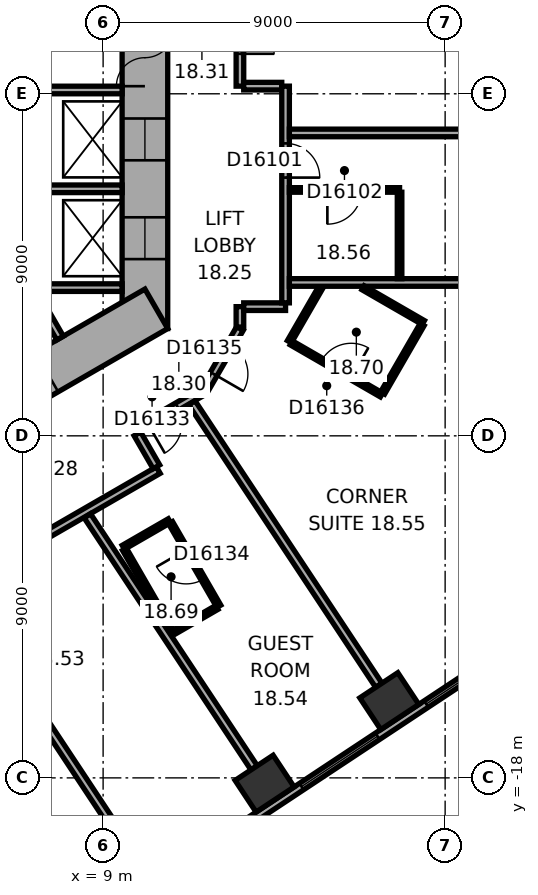
"""IFC4 building model, lengths in metres.
Left out: names, types, materials, properties, quantities, classifications, styles, units other than length and angle.
Written with IfcOpenShell. Run it as: python <this file> out.ifc"""

import sys

from ifc_helpers import new_model, si_unit, direction, frame, frame_2d, origin, origin_2d, place, context, subcontext, project, spatial, rectangle, extrude, element, fill, save


model = new_model("IFC4")
c1 = context("Model", 3, precision=1e-05, world=origin(), true_north=direction((0.0, 1.0)))
c2 = subcontext(c1, "Body", "Model", "MODEL_VIEW")
j1 = project(units=[si_unit("LENGTHUNIT", "METRE"), si_unit("PLANEANGLEUNIT", "RADIAN")], contexts=[c1])
p1 = place(None, origin())
s1 = spatial("IfcSite", under=j1, at=p1, CompositionType="ELEMENT")
p2 = place(p1, origin())
s2 = spatial("IfcBuilding", under=s1, at=p2, CompositionType="ELEMENT")
p3 = place(p2, frame((0.0, 0.0, 83.6)))
s3 = spatial("IfcBuildingStorey", under=s2, at=p3, CompositionType="ELEMENT", Elevation=83.6)
for number, where, z_axis, x_axis in (
    (1, (13.25, -18.152, 0.0), (0.0, 0.0, 1.0), (0.834, 0.552, 0.0)),
    (2, (16.531, -15.981, 0.0), (0.0, 0.0, 1.0), (0.834, 0.552, 0.0)),
):
    element("IfcColumn", number, at=place(p3, frame(where, z_axis=z_axis, x_axis=x_axis)), inside=s3, PredefinedType="COLUMN", context=c2, shape_type="SweptSolid", body=[
        extrude(rectangle(XDim=1.2, YDim=1.0, at=origin_2d()), origin(), (0.0, 0.0, 1.0), 3.3),
    ])
p4 = place(p3, frame((10.1, -6.177, 0.0), z_axis=(0.0, 0.0, 1.0), x_axis=(0.0, 1.0, 0.0)))
e3 = element("IfcWall", 3, at=p4, inside=s3, PredefinedType="SHEAR", context=c2, shape_type="SweptSolid", body=[
    extrude(rectangle(XDim=12.355, YDim=1.2, at=frame_2d((6.177, 0.0))), origin(), (0.0, 0.0, 1.0), 3.3),
])
p5 = place(p4, frame((6.378, 0.0, 0.0)))
e4 = element("IfcOpeningElement", 4, at=p5, cuts=e3, PredefinedType="OPENING", context=c2, shape_type="SweptSolid", body=[
    extrude(rectangle(XDim=1.5, YDim=2.1, at=frame_2d((0.75, 1.05))), frame((0.0, 0.61, 0.0), z_axis=(0.0, -1.0, 0.0), x_axis=(1.0, 0.0, 0.0)), (0.0, 0.0, 1.0), 1.22),
])
p6 = place(p4, frame((1.828, 0.0, 0.0)))
e5 = element("IfcOpeningElement", 5, at=p6, cuts=e3, PredefinedType="OPENING", context=c2, shape_type="SweptSolid", body=[
    extrude(rectangle(XDim=1.1, YDim=2.1, at=frame_2d((0.55, 1.05))), frame((0.0, 0.61, 0.0), z_axis=(0.0, -1.0, 0.0), x_axis=(1.0, 0.0, 0.0)), (0.0, 0.0, 1.0), 1.22),
])
p7 = place(p4, frame((4.427, 0.0, 0.0)))
e6 = element("IfcOpeningElement", 6, at=p7, cuts=e3, PredefinedType="OPENING", context=c2, shape_type="SweptSolid", body=[
    extrude(rectangle(XDim=1.1, YDim=2.1, at=frame_2d((0.55, 1.05))), frame((0.0, 0.61, 0.0), z_axis=(0.0, -1.0, 0.0), x_axis=(1.0, 0.0, 0.0)), (0.0, 0.0, 1.0), 1.22),
])
p8 = place(p3, frame((-0.3, -11.836, 0.0), z_axis=(0.0, 0.0, 1.0), x_axis=(0.866021384402, 0.500006961711, 0.0)))
e7 = element("IfcWall", 7, at=p8, inside=s3, PredefinedType="SHEAR", context=c2, shape_type="SweptSolid", body=[
    extrude(rectangle(XDim=12.355, YDim=1.2, at=frame_2d((6.178, 0.0))), origin(), (0.0, 0.0, 1.0), 3.3),
])
p9 = place(p8, frame((4.128, 0.0, 0.0)))
e8 = element("IfcOpeningElement", 8, at=p9, cuts=e7, PredefinedType="OPENING", context=c2, shape_type="SweptSolid", body=[
    extrude(rectangle(XDim=0.9, YDim=2.1, at=frame_2d((0.45, 1.05))), frame((0.0, 0.61, 0.0), z_axis=(0.0, -1.0, 0.0), x_axis=(1.0, 0.0, 0.0)), (0.0, 0.0, 1.0), 1.22),
])
p10 = place(p8, frame((7.928, 0.0, 0.0)))
e9 = element("IfcOpeningElement", 9, at=p10, cuts=e7, PredefinedType="OPENING", context=c2, shape_type="SweptSolid", body=[
    extrude(rectangle(XDim=1.1, YDim=2.1, at=frame_2d((0.55, 1.05))), frame((0.0, 0.61, 0.0), z_axis=(0.0, -1.0, 0.0), x_axis=(1.0, 0.0, 0.0)), (0.0, 0.0, 1.0), 1.22),
])
p11 = place(p3, frame((3.083, -25.601, 0.0), z_axis=(0.0, 0.0, 1.0), x_axis=(0.833884295743, 0.551939291329, 0.0)))
e10 = element("IfcWall", 10, at=p11, inside=s3, PredefinedType="STANDARD", context=c2, shape_type="SweptSolid", body=[
    extrude(rectangle(XDim=21.246, YDim=0.2, at=frame_2d((10.623, 0.0))), origin(), (0.0, 0.0, 1.0), 3.3),
])
p12 = place(p11, frame((1.553, 0.0, 0.8)))
e11 = element("IfcOpeningElement", 11, at=p12, cuts=e10, PredefinedType="OPENING", context=c2, shape_type="SweptSolid", body=[
    extrude(rectangle(XDim=2.4, YDim=1.7, at=frame_2d((1.2, 0.85))), frame((0.0, 0.11, 0.0), z_axis=(0.0, -1.0, 0.0), x_axis=(1.0, 0.0, 0.0)), (0.0, 0.0, 1.0), 0.22),
])
p13 = place(p11, frame((5.488, 0.0, 0.8)))
e12 = element("IfcOpeningElement", 12, at=p13, cuts=e10, PredefinedType="OPENING", context=c2, shape_type="SweptSolid", body=[
    extrude(rectangle(XDim=2.4, YDim=1.7, at=frame_2d((1.2, 0.85))), frame((0.0, 0.11, 0.0), z_axis=(0.0, -1.0, 0.0), x_axis=(1.0, 0.0, 0.0)), (0.0, 0.0, 1.0), 0.22),
])
p14 = place(p11, frame((9.422, 0.0, 0.8)))
e13 = element("IfcOpeningElement", 13, at=p14, cuts=e10, PredefinedType="OPENING", context=c2, shape_type="SweptSolid", body=[
    extrude(rectangle(XDim=2.4, YDim=1.7, at=frame_2d((1.2, 0.85))), frame((0.0, 0.11, 0.0), z_axis=(0.0, -1.0, 0.0), x_axis=(1.0, 0.0, 0.0)), (0.0, 0.0, 1.0), 0.22),
])
p15 = place(p11, frame((13.357, 0.0, 0.8)))
e14 = element("IfcOpeningElement", 14, at=p15, cuts=e10, PredefinedType="OPENING", context=c2, shape_type="SweptSolid", body=[
    extrude(rectangle(XDim=2.4, YDim=1.7, at=frame_2d((1.2, 0.85))), frame((0.0, 0.11, 0.0), z_axis=(0.0, -1.0, 0.0), x_axis=(1.0, 0.0, 0.0)), (0.0, 0.0, 1.0), 0.22),
])
p16 = place(p11, frame((17.291, 0.0, 0.8)))
e15 = element("IfcOpeningElement", 15, at=p16, cuts=e10, PredefinedType="OPENING", context=c2, shape_type="SweptSolid", body=[
    extrude(rectangle(XDim=2.4, YDim=1.7, at=frame_2d((1.2, 0.85))), frame((0.0, 0.11, 0.0), z_axis=(0.0, -1.0, 0.0), x_axis=(1.0, 0.0, 0.0)), (0.0, 0.0, 1.0), 0.22),
])
for number, where, z_axis, x_axis in (
    (16, (7.3, -5.1, 0.0), (0.0, 0.0, 1.0), (1.0, 0.0, 0.0)),
    (17, (7.3, -2.5, 0.0), (0.0, 0.0, 1.0), (1.0, 0.0, 0.0)),
    (18, (7.3, 0.1, 0.0), (0.0, 0.0, 1.0), (1.0, 0.0, 0.0)),
    (19, (6.768, -4.522, 0.0), (0.0, 0.0, 1.0), (0.5, -0.866, 0.0)),
):
    element("IfcWall", number, at=place(p3, frame(where, z_axis=z_axis, x_axis=x_axis)), inside=s3, PredefinedType="PARTITIONING", context=c2, shape_type="SweptSolid", body=[
        extrude(rectangle(XDim=2.2, YDim=0.2, at=frame_2d((1.1, 0.0))), origin(), (0.0, 0.0, 1.0), 3.05),
    ])
p17 = place(p3, frame((7.419, -11.653, 0.0), z_axis=(0.0, 0.0, 1.0), x_axis=(0.866038154057, 0.49997791523, 0.0)))
e20 = element("IfcWall", 20, at=p17, inside=s3, PredefinedType="PARTITIONING", context=c2, shape_type="SweptSolid", body=[
    extrude(rectangle(XDim=3.502, YDim=0.2, at=frame_2d((1.751, 0.0))), origin(), (0.0, 0.0, 1.0), 3.05),
])
p18 = place(p3, frame((9.532, -11.934, 0.0), z_axis=(0.0, 0.0, 1.0), x_axis=(0.866034573852, 0.49998411664, 0.0)))
e21 = element("IfcWall", 21, at=p18, inside=s3, PredefinedType="PARTITIONING", context=c2, shape_type="SweptSolid", body=[
    extrude(rectangle(XDim=1.4, YDim=0.12, at=frame_2d((0.7, 0.0))), origin(), (0.0, 0.0, 1.0), 3.05),
])
p19 = place(p3, frame((9.693, -19.907, 0.0), z_axis=(0.0, 0.0, 1.0), x_axis=(-0.551938394837, 0.833884889121, 0.0)))
e22 = element("IfcWall", 22, at=p19, inside=s3, PredefinedType="PARTITIONING", context=c2, shape_type="SweptSolid", body=[
    extrude(rectangle(XDim=9.394, YDim=0.2, at=frame_2d((4.697, 0.0))), origin(), (0.0, 0.0, 1.0), 2.6),
])
p20 = place(p3, frame((9.852, -8.861, 0.0), z_axis=(0.0, 0.0, 1.0), x_axis=(0.866013291437, 0.500020978615, 0.0)))
e23 = element("IfcWall", 23, at=p20, inside=s3, PredefinedType="PARTITIONING", context=c2, shape_type="SweptSolid", body=[
    extrude(rectangle(XDim=2.077, YDim=0.2, at=frame_2d((1.038, 0.0))), origin(), (0.0, 0.0, 1.0), 3.05),
])
p21 = place(p20, frame((0.372, 0.0, 0.0)))
e24 = element("IfcOpeningElement", 24, at=p21, cuts=e23, PredefinedType="OPENING", context=c2, shape_type="SweptSolid", body=[
    extrude(rectangle(XDim=0.9, YDim=2.1, at=frame_2d((0.45, 1.05))), frame((0.0, 0.11, 0.0), z_axis=(0.0, -1.0, 0.0), x_axis=(1.0, 0.0, 0.0)), (0.0, 0.0, 1.0), 0.22),
])
p22 = place(p3, frame((10.402, -9.815, 0.0), z_axis=(0.0, 0.0, 1.0), x_axis=(-0.499968756647, 0.866043441391, 0.0)))
e25 = element("IfcWall", 25, at=p22, inside=s3, PredefinedType="PARTITIONING", context=c2, shape_type="SweptSolid", body=[
    extrude(rectangle(XDim=1.001, YDim=0.2, at=frame_2d((0.5, 0.0))), origin(), (0.0, 0.0, 1.0), 3.05),
])
p23 = place(p3, frame((10.775, -11.286, 0.0), z_axis=(0.0, 0.0, 1.0), x_axis=(0.500046963369, -0.865998287773, 0.0)))
e26 = element("IfcWall", 26, at=p23, inside=s3, PredefinedType="PARTITIONING", context=c2, shape_type="SweptSolid", body=[
    extrude(rectangle(XDim=2.54, YDim=0.12, at=frame_2d((1.27, 0.0))), origin(), (0.0, 0.0, 1.0), 3.05),
])
p24 = place(p23, frame((0.82, 0.0, 0.0)))
e27 = element("IfcOpeningElement", 27, at=p24, cuts=e26, PredefinedType="OPENING", context=c2, shape_type="SweptSolid", body=[
    extrude(rectangle(XDim=0.9, YDim=2.1, at=frame_2d((0.45, 1.05))), frame((0.0, 0.07, 0.0), z_axis=(0.0, -1.0, 0.0), x_axis=(1.0, 0.0, 0.0)), (0.0, 0.0, 1.0), 0.14),
])
p25 = place(p3, frame((10.833, -14.185, 0.0), z_axis=(0.0, 0.0, 1.0), x_axis=(-0.500005339912, 0.866022320763, 0.0)))
e28 = element("IfcWall", 28, at=p25, inside=s3, PredefinedType="PARTITIONING", context=c2, shape_type="SweptSolid", body=[
    extrude(rectangle(XDim=2.54, YDim=0.12, at=frame_2d((1.27, 0.0))), origin(), (0.0, 0.0, 1.0), 3.05),
])
p26 = place(p3, frame((11.67, -7.788, 0.0), z_axis=(0.0, 0.0, 1.0), x_axis=(0.500063286585, 0.865988862174, 0.0)))
e29 = element("IfcWall", 29, at=p26, inside=s3, PredefinedType="PARTITIONING", context=c2, shape_type="SweptSolid", body=[
    extrude(rectangle(XDim=1.86, YDim=0.2, at=frame_2d((0.93, 0.0))), origin(), (0.0, 0.0, 1.0), 3.05),
])
p27 = place(p26, frame((0.48, 0.0, 0.0)))
e30 = element("IfcOpeningElement", 30, at=p27, cuts=e29, PredefinedType="OPENING", context=c2, shape_type="SweptSolid", body=[
    extrude(rectangle(XDim=0.9, YDim=2.1, at=frame_2d((0.45, 1.05))), frame((0.0, 0.11, 0.0), z_axis=(0.0, -1.0, 0.0), x_axis=(1.0, 0.0, 0.0)), (0.0, 0.0, 1.0), 0.22),
])
p28 = place(p3, frame((11.993, -13.515, 0.0), z_axis=(0.0, 0.0, 1.0), x_axis=(-0.865956862152, -0.500118698802, 0.0)))
e31 = element("IfcWall", 31, at=p28, inside=s3, PredefinedType="PARTITIONING", context=c2, shape_type="SweptSolid", body=[
    extrude(rectangle(XDim=1.28, YDim=0.12, at=frame_2d((0.64, 0.0))), origin(), (0.0, 0.0, 1.0), 3.05),
])
p29 = place(p3, frame((12.6, -6.138, 0.0), z_axis=(0.0, 0.0, 1.0), x_axis=(0.0, 1.0, 0.0)))
e32 = element("IfcWall", 32, at=p29, inside=s3, PredefinedType="PARTITIONING", context=c2, shape_type="SweptSolid", body=[
    extrude(rectangle(XDim=0.537, YDim=0.2, at=frame_2d((0.268, 0.0))), origin(), (0.0, 0.0, 1.0), 3.05),
])
p30 = place(p3, frame((12.6, 0.201, 0.0), z_axis=(0.0, 0.0, 1.0), x_axis=(0.0, 1.0, 0.0)))
e33 = element("IfcWall", 33, at=p30, inside=s3, PredefinedType="PARTITIONING", context=c2, shape_type="SweptSolid", body=[
    extrude(rectangle(XDim=2.604, YDim=0.2, at=frame_2d((1.302, 0.0))), origin(), (0.0, 0.0, 1.0), 3.05),
])
p31 = place(p30, frame((0.852, 0.0, 0.0)))
e34 = element("IfcOpeningElement", 34, at=p31, cuts=e33, PredefinedType="OPENING", context=c2, shape_type="SweptSolid", body=[
    extrude(rectangle(XDim=0.9, YDim=2.1, at=frame_2d((0.45, 1.05))), frame((0.0, 0.11, 0.0), z_axis=(0.0, -1.0, 0.0), x_axis=(1.0, 0.0, 0.0)), (0.0, 0.0, 1.0), 0.22),
])
p32 = place(p3, frame((12.7, -5.601, 0.0), z_axis=(0.0, 0.0, 1.0), x_axis=(1.0, 0.0, 0.0)))
e35 = element("IfcWall", 35, at=p32, inside=s3, PredefinedType="PARTITIONING", context=c2, shape_type="SweptSolid", body=[
    extrude(rectangle(XDim=1.101, YDim=0.2, at=frame_2d((0.551, 0.0))), origin(), (0.0, 0.0, 1.0), 3.05),
])
p33 = place(p3, frame((12.974, -17.735, 0.0), z_axis=(0.0, 0.0, 1.0), x_axis=(-0.55192625685, 0.833892922982, 0.0)))
e36 = element("IfcWall", 36, at=p33, inside=s3, PredefinedType="PARTITIONING", context=c2, shape_type="SweptSolid", body=[
    extrude(rectangle(XDim=7.95, YDim=0.2, at=frame_2d((3.975, 0.0))), origin(), (0.0, 0.0, 1.0), 3.05),
])
p34 = place(p3, frame((13.701, 0.201, 0.0), z_axis=(0.0, 0.0, 1.0), x_axis=(-1.0, 0.0, 0.0)))
e37 = element("IfcWall", 37, at=p34, inside=s3, PredefinedType="PARTITIONING", context=c2, shape_type="SweptSolid", body=[
    extrude(rectangle(XDim=1.001, YDim=0.2, at=frame_2d((0.5, 0.0))), origin(), (0.0, 0.0, 1.0), 3.05),
])
p35 = place(p3, frame((13.801, -5.501, 0.0), z_axis=(0.0, 0.0, 1.0), x_axis=(0.0, 1.0, 0.0)))
e38 = element("IfcWall", 38, at=p35, inside=s3, PredefinedType="PARTITIONING", context=c2, shape_type="SweptSolid", body=[
    extrude(rectangle(XDim=5.702, YDim=0.2, at=frame_2d((2.851, 0.0))), origin(), (0.0, 0.0, 1.0), 3.05),
])
p36 = place(p35, frame((3.296, 0.0, 0.0)))
e39 = element("IfcOpeningElement", 39, at=p36, cuts=e38, PredefinedType="OPENING", context=c2, shape_type="SweptSolid", body=[
    extrude(rectangle(XDim=0.9, YDim=2.1, at=frame_2d((0.45, 1.05))), frame((0.0, 0.11, 0.0), z_axis=(0.0, -1.0, 0.0), x_axis=(1.0, 0.0, 0.0)), (0.0, 0.0, 1.0), 0.22),
])
p37 = place(p3, frame((13.901, -6.524, 0.0), z_axis=(0.0, 0.0, 1.0), x_axis=(0.499964162598, 0.86604609353, 0.0)))
e40 = element("IfcWall", 40, at=p37, inside=s3, PredefinedType="PARTITIONING", context=c2, shape_type="SweptSolid", body=[
    extrude(rectangle(XDim=1.661, YDim=0.12, at=frame_2d((0.831, 0.0))), origin(), (0.0, 0.0, 1.0), 3.05),
])
p38 = place(p3, frame((13.901, -4.965, 0.0), z_axis=(0.0, 0.0, 1.0), x_axis=(1.0, 0.0, 0.0)))
e41 = element("IfcWall", 41, at=p38, inside=s3, PredefinedType="PARTITIONING", context=c2, shape_type="SweptSolid", body=[
    extrude(rectangle(XDim=8.049, YDim=0.2, at=frame_2d((4.024, 0.0))), origin(), (0.0, 0.0, 1.0), 3.05),
])
p39 = place(p3, frame((13.901, -2.53, 0.0), z_axis=(0.0, 0.0, 1.0), x_axis=(1.0, 0.0, 0.0)))
e42 = element("IfcWall", 42, at=p39, inside=s3, PredefinedType="PARTITIONING", context=c2, shape_type="SweptSolid", body=[
    extrude(rectangle(XDim=2.9, YDim=0.12, at=frame_2d((1.45, 0.0))), origin(), (0.0, 0.0, 1.0), 3.05),
])
p40 = place(p39, frame((1.0, 0.0, 0.0)))
e43 = element("IfcOpeningElement", 43, at=p40, cuts=e42, PredefinedType="OPENING", context=c2, shape_type="SweptSolid", body=[
    extrude(rectangle(XDim=0.9, YDim=2.1, at=frame_2d((0.45, 1.05))), frame((0.0, 0.07, 0.0), z_axis=(0.0, -1.0, 0.0), x_axis=(1.0, 0.0, 0.0)), (0.0, 0.0, 1.0), 0.14),
])
p41 = place(p3, frame((15.841, -5.104, 0.0), z_axis=(0.0, 0.0, 1.0), x_axis=(0.866025591402, -0.499999675036, 0.0)))
e44 = element("IfcWall", 44, at=p41, inside=s3, PredefinedType="PARTITIONING", context=c2, shape_type="SweptSolid", body=[
    extrude(rectangle(XDim=1.83, YDim=0.12, at=frame_2d((0.915, 0.0))), origin(), (0.0, 0.0, 1.0), 3.05),
])
p42 = place(p3, frame((16.255, -15.564, 0.0), z_axis=(0.0, 0.0, 1.0), x_axis=(-0.55192208744, 0.833895682562, 0.0)))
e45 = element("IfcWall", 45, at=p42, inside=s3, PredefinedType="PARTITIONING", context=c2, shape_type="SweptSolid", body=[
    extrude(rectangle(XDim=8.913, YDim=0.2, at=frame_2d((4.457, 0.0))), origin(), (0.0, 0.0, 1.0), 2.6),
])
p43 = place(p3, frame((16.326, -7.925, 0.0), z_axis=(0.0, 0.0, 1.0), x_axis=(-0.865997131366, 0.500048966069, 0.0)))
e46 = element("IfcWall", 46, at=p43, inside=s3, PredefinedType="PARTITIONING", context=c2, shape_type="SweptSolid", body=[
    extrude(rectangle(XDim=2.74, YDim=0.12, at=frame_2d((1.37, 0.0))), origin(), (0.0, 0.0, 1.0), 3.05),
])
p44 = place(p43, frame((0.92, 0.0, 0.0)))
e47 = element("IfcOpeningElement", 47, at=p44, cuts=e46, PredefinedType="OPENING", context=c2, shape_type="SweptSolid", body=[
    extrude(rectangle(XDim=0.9, YDim=2.1, at=frame_2d((0.45, 1.05))), frame((0.0, 0.07, 0.0), z_axis=(0.0, -1.0, 0.0), x_axis=(1.0, 0.0, 0.0)), (0.0, 0.0, 1.0), 0.14),
])
p45 = place(p3, frame((16.801, -2.59, 0.0), z_axis=(0.0, 0.0, 1.0), x_axis=(0.0, -1.0, 0.0)))
e48 = element("IfcWall", 48, at=p45, inside=s3, PredefinedType="PARTITIONING", context=c2, shape_type="SweptSolid", body=[
    extrude(rectangle(XDim=2.274, YDim=0.12, at=frame_2d((1.137, 0.0))), origin(), (0.0, 0.0, 1.0), 3.05),
])
p46 = place(p3, frame((17.396, -6.071, 0.0), z_axis=(0.0, 0.0, 1.0), x_axis=(-0.500027264788, -0.866009661879, 0.0)))
e49 = element("IfcWall", 49, at=p46, inside=s3, PredefinedType="PARTITIONING", context=c2, shape_type="SweptSolid", body=[
    extrude(rectangle(XDim=2.08, YDim=0.12, at=frame_2d((1.04, 0.0))), origin(), (0.0, 0.0, 1.0), 3.05),
])
p47 = place(p3, frame((21.95, -1.03, 0.0), z_axis=(0.0, 0.0, 1.0), x_axis=(-1.0, 0.0, 0.0)))
e50 = element("IfcWall", 50, at=p47, inside=s3, PredefinedType="PARTITIONING", context=c2, shape_type="SweptSolid", body=[
    extrude(rectangle(XDim=8.049, YDim=0.2, at=frame_2d((4.024, 0.0))), origin(), (0.0, 0.0, 1.0), 2.6),
])
p48 = place(p15, origin())
e51 = element("IfcWindow", 51, at=p48, inside=s3, PartitioningType="SINGLE_PANEL", PredefinedType="WINDOW", context=c2, shape_type="SweptSolid", body=[
    extrude(rectangle(XDim=2.4, YDim=1.7, at=frame_2d((1.2, 0.85))), frame((0.0, 0.03, 0.0), z_axis=(0.0, -1.0, 0.0), x_axis=(1.0, 0.0, 0.0)), (0.0, 0.0, 1.0), 0.06),
])
fill(e14, e51)
p49 = place(p16, origin())
e52 = element("IfcWindow", 52, at=p49, inside=s3, PartitioningType="SINGLE_PANEL", PredefinedType="WINDOW", context=c2, shape_type="SweptSolid", body=[
    extrude(rectangle(XDim=2.4, YDim=1.7, at=frame_2d((1.2, 0.85))), frame((0.0, 0.03, 0.0), z_axis=(0.0, -1.0, 0.0), x_axis=(1.0, 0.0, 0.0)), (0.0, 0.0, 1.0), 0.06),
])
fill(e15, e52)
p50 = place(p5, origin())
e53 = element("IfcDoor", 53, at=p50, inside=s3, OperationType="DOUBLE_DOOR_SINGLE_SWING", PredefinedType="DOOR", context=c2, shape_type="SweptSolid", body=[
    extrude(rectangle(XDim=1.5, YDim=2.1, at=frame_2d((0.75, 1.05))), frame((0.0, 0.025, 0.0), z_axis=(0.0, -1.0, 0.0), x_axis=(1.0, 0.0, 0.0)), (0.0, 0.0, 1.0), 0.05),
])
fill(e4, e53)
p51 = place(p6, origin())
e54 = element("IfcDoor", 54, at=p51, inside=s3, OperationType="DOUBLE_DOOR_SLIDING", PredefinedType="DOOR", context=c2, shape_type="SweptSolid", body=[
    extrude(rectangle(XDim=1.1, YDim=2.1, at=frame_2d((0.55, 1.05))), frame((0.0, 0.025, 0.0), z_axis=(0.0, -1.0, 0.0), x_axis=(1.0, 0.0, 0.0)), (0.0, 0.0, 1.0), 0.05),
])
fill(e5, e54)
p52 = place(p7, origin())
e55 = element("IfcDoor", 55, at=p52, inside=s3, OperationType="DOUBLE_DOOR_SLIDING", PredefinedType="DOOR", context=c2, shape_type="SweptSolid", body=[
    extrude(rectangle(XDim=1.1, YDim=2.1, at=frame_2d((0.55, 1.05))), frame((0.0, 0.025, 0.0), z_axis=(0.0, -1.0, 0.0), x_axis=(1.0, 0.0, 0.0)), (0.0, 0.0, 1.0), 0.05),
])
fill(e6, e55)
p53 = place(p36, origin())
e56 = element("IfcDoor", 56, at=p53, inside=s3, OperationType="SINGLE_SWING_LEFT", PredefinedType="DOOR", context=c2, shape_type="SweptSolid", body=[
    extrude(rectangle(XDim=0.9, YDim=2.1, at=frame_2d((0.45, 1.05))), frame((0.0, 0.025, 0.0), z_axis=(0.0, -1.0, 0.0), x_axis=(1.0, 0.0, 0.0)), (0.0, 0.0, 1.0), 0.05),
])
fill(e39, e56)
p54 = place(p40, origin())
e57 = element("IfcDoor", 57, at=p54, inside=s3, OperationType="SINGLE_SWING_LEFT", PredefinedType="DOOR", context=c2, shape_type="SweptSolid", body=[
    extrude(rectangle(XDim=0.9, YDim=2.1, at=frame_2d((0.45, 1.05))), frame((0.0, 0.025, 0.0), z_axis=(0.0, -1.0, 0.0), x_axis=(1.0, 0.0, 0.0)), (0.0, 0.0, 1.0), 0.05),
])
fill(e43, e57)
p55 = place(p31, origin())
e58 = element("IfcDoor", 58, at=p55, inside=s3, OperationType="SINGLE_SWING_LEFT", PredefinedType="DOOR", context=c2, shape_type="SweptSolid", body=[
    extrude(rectangle(XDim=0.9, YDim=2.1, at=frame_2d((0.45, 1.05))), frame((0.0, 0.025, 0.0), z_axis=(0.0, -1.0, 0.0), x_axis=(1.0, 0.0, 0.0)), (0.0, 0.0, 1.0), 0.05),
])
fill(e34, e58)
p56 = place(p21, origin())
e59 = element("IfcDoor", 59, at=p56, inside=s3, OperationType="SINGLE_SWING_LEFT", PredefinedType="DOOR", context=c2, shape_type="SweptSolid", body=[
    extrude(rectangle(XDim=0.9, YDim=2.1, at=frame_2d((0.45, 1.05))), frame((0.0, 0.025, 0.0), z_axis=(0.0, -1.0, 0.0), x_axis=(1.0, 0.0, 0.0)), (0.0, 0.0, 1.0), 0.05),
])
fill(e24, e59)
p57 = place(p24, origin())
e60 = element("IfcDoor", 60, at=p57, inside=s3, OperationType="SINGLE_SWING_LEFT", PredefinedType="DOOR", context=c2, shape_type="SweptSolid", body=[
    extrude(rectangle(XDim=0.9, YDim=2.1, at=frame_2d((0.45, 1.05))), frame((0.0, 0.025, 0.0), z_axis=(0.0, -1.0, 0.0), x_axis=(1.0, 0.0, 0.0)), (0.0, 0.0, 1.0), 0.05),
])
fill(e27, e60)
p58 = place(p27, origin())
e61 = element("IfcDoor", 61, at=p58, inside=s3, OperationType="SINGLE_SWING_LEFT", PredefinedType="DOOR", context=c2, shape_type="SweptSolid", body=[
    extrude(rectangle(XDim=0.9, YDim=2.1, at=frame_2d((0.45, 1.05))), frame((0.0, 0.025, 0.0), z_axis=(0.0, -1.0, 0.0), x_axis=(1.0, 0.0, 0.0)), (0.0, 0.0, 1.0), 0.05),
])
fill(e30, e61)
p59 = place(p44, origin())
e62 = element("IfcDoor", 62, at=p59, inside=s3, OperationType="SINGLE_SWING_LEFT", PredefinedType="DOOR", context=c2, shape_type="SweptSolid", body=[
    extrude(rectangle(XDim=0.9, YDim=2.1, at=frame_2d((0.45, 1.05))), frame((0.0, 0.025, 0.0), z_axis=(0.0, -1.0, 0.0), x_axis=(1.0, 0.0, 0.0)), (0.0, 0.0, 1.0), 0.05),
])
fill(e47, e62)
save(model, sys.argv[1])
